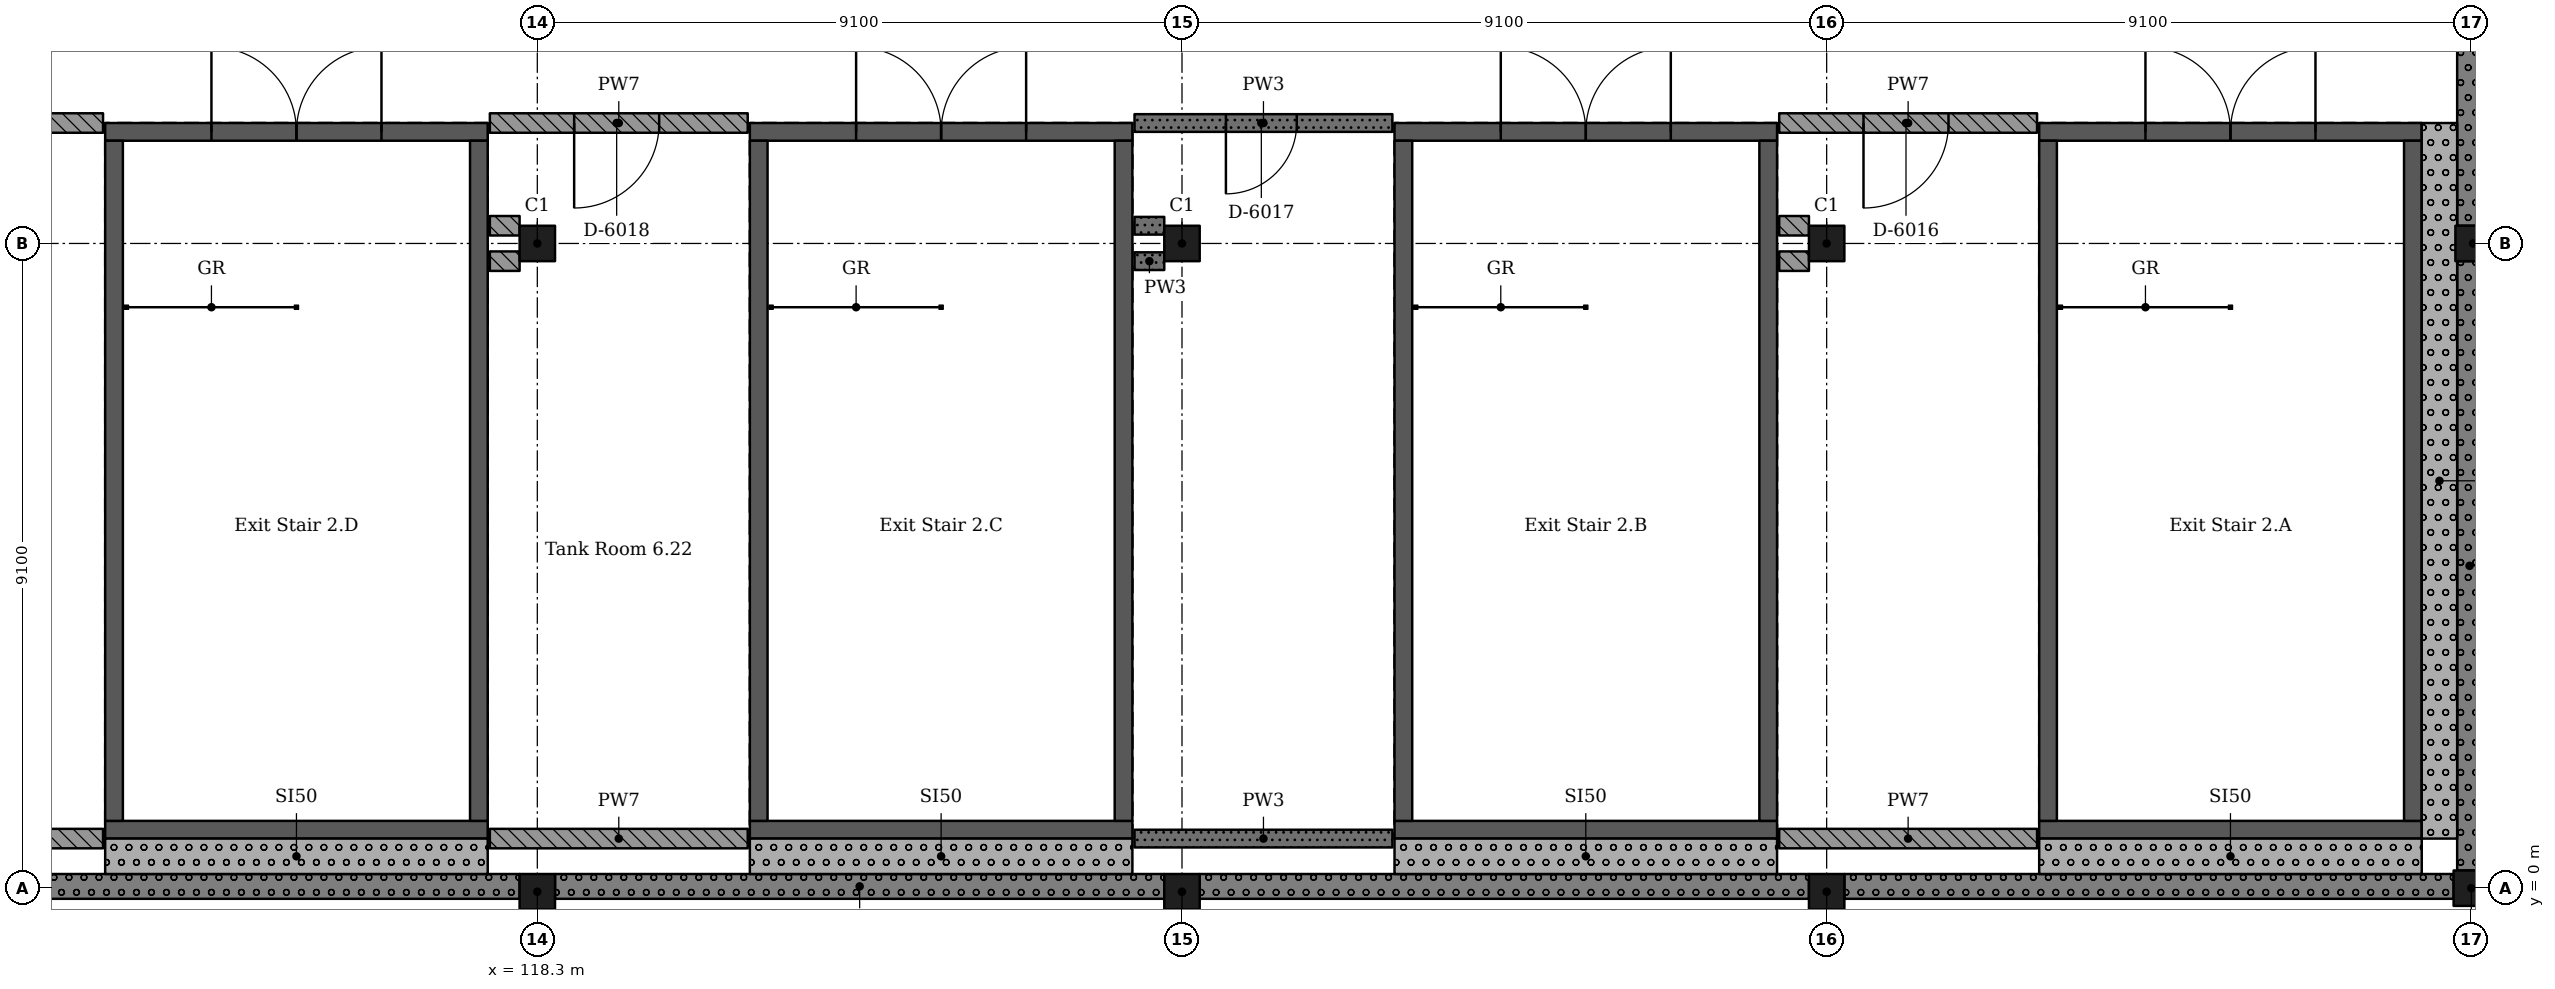
"""IFC4 building model, lengths in metres.
Left out: names, types, materials, properties, quantities, classifications, styles, units other than length and angle.
Written with IfcOpenShell. Run it as: python <this file> out.ifc"""

import sys

from ifc_helpers import new_model, si_unit, direction, frame, frame_2d, origin, origin_2d, place, context, subcontext, project, spatial, rectangle, extrude, element, fill, save


model = new_model("IFC4")
c1 = context("Model", 3, precision=1e-05, world=origin(), true_north=direction((0.0, 1.0)))
c2 = subcontext(c1, "Body", "Model", "MODEL_VIEW")
j1 = project(units=[si_unit("LENGTHUNIT", "METRE"), si_unit("PLANEANGLEUNIT", "RADIAN")], contexts=[c1])
p1 = place(None, origin())
s1 = spatial("IfcSite", under=j1, at=p1, CompositionType="ELEMENT")
p2 = place(p1, origin())
s2 = spatial("IfcBuilding", under=s1, at=p2, CompositionType="ELEMENT")
p3 = place(p2, frame((0.0, 0.0, 29.12)))
s3 = spatial("IfcBuildingStorey", under=s2, at=p3, CompositionType="ELEMENT", Elevation=29.12)
for number, where, z_axis, x_axis in (
    (1, (118.3, -0.05, 0.0), (0.0, 0.0, 1.0), (1.0, 0.0, 0.0)),
    (2, (118.3, 9.1, 0.0), (0.0, 0.0, 1.0), (1.0, 0.0, 0.0)),
    (3, (127.4, -0.05, 0.0), (0.0, 0.0, 1.0), (1.0, 0.0, 0.0)),
    (4, (127.4, 9.1, 0.0), (0.0, 0.0, 1.0), (1.0, 0.0, 0.0)),
    (5, (136.5, -0.05, 0.0), (0.0, 0.0, 1.0), (1.0, 0.0, 0.0)),
    (6, (136.5, 9.1, 0.0), (0.0, 0.0, 1.0), (1.0, 0.0, 0.0)),
    (7, (145.6, 0.0, 0.0), (0.0, 0.0, 1.0), (1.0, 0.0, 0.0)),
    (8, (145.625, 9.1, 0.0), (0.0, 0.0, 1.0), (1.0, 0.0, 0.0)),
):
    element("IfcColumn", number, at=place(p3, frame(where, z_axis=z_axis, x_axis=x_axis)), inside=s3, PredefinedType="COLUMN", context=c2, shape_type="SweptSolid", body=[
        extrude(rectangle(XDim=0.5, YDim=0.5, at=origin_2d()), origin(), (0.0, 0.0, 1.0), 4.55),
    ])
p4 = place(p3, frame((144.9, 0.825, 0.0), z_axis=(0.0, 0.0, 1.0), x_axis=(-1.0, 0.0, 0.0)))
e9 = element("IfcWall", 9, at=p4, inside=s3, PredefinedType="SHEAR", context=c2, shape_type="SweptSolid", body=[
    extrude(rectangle(XDim=5.4, YDim=0.25, at=frame_2d((2.7, 0.0))), origin(), (0.0, 0.0, 1.0), 4.55),
])
p5 = place(p3, frame((144.9, 10.675, 0.0), z_axis=(0.0, 0.0, 1.0), x_axis=(-1.0, 0.0, 0.0)))
e10 = element("IfcWall", 10, at=p5, inside=s3, PredefinedType="SHEAR", context=c2, shape_type="SweptSolid", body=[
    extrude(rectangle(XDim=5.4, YDim=0.25, at=frame_2d((2.7, 0.0))), origin(), (0.0, 0.0, 1.0), 4.55),
])
p6 = place(p5, frame((1.5, 0.0, 0.0)))
e11 = element("IfcOpeningElement", 11, at=p6, cuts=e10, PredefinedType="OPENING", context=c2, shape_type="SweptSolid", body=[
    extrude(rectangle(XDim=2.4, YDim=2.1, at=frame_2d((1.2, 1.05))), frame((0.0, 0.135, 0.0), z_axis=(0.0, -1.0, 0.0), x_axis=(1.0, 0.0, 0.0)), (0.0, 0.0, 1.0), 0.27),
])
for number, where, z_axis, x_axis in (
    (12, (139.625, 10.55, 0.0), (0.0, 0.0, 1.0), (0.0, -1.0, 0.0)),
    (13, (144.775, 10.55, 0.0), (0.0, 0.0, 1.0), (0.0, -1.0, 0.0)),
):
    element("IfcWall", number, at=place(p3, frame(where, z_axis=z_axis, x_axis=x_axis)), inside=s3, PredefinedType="SHEAR", context=c2, shape_type="SweptSolid", body=[
        extrude(rectangle(XDim=9.6, YDim=0.25, at=frame_2d((4.8, 0.0))), origin(), (0.0, 0.0, 1.0), 4.55),
    ])
p7 = place(p3, frame((135.8, 0.825, 0.0), z_axis=(0.0, 0.0, 1.0), x_axis=(-1.0, 0.0, 0.0)))
e14 = element("IfcWall", 14, at=p7, inside=s3, PredefinedType="SHEAR", context=c2, shape_type="SweptSolid", body=[
    extrude(rectangle(XDim=5.4, YDim=0.25, at=frame_2d((2.7, 0.0))), origin(), (0.0, 0.0, 1.0), 4.55),
])
p8 = place(p3, frame((135.8, 10.675, 0.0), z_axis=(0.0, 0.0, 1.0), x_axis=(-1.0, 0.0, 0.0)))
e15 = element("IfcWall", 15, at=p8, inside=s3, PredefinedType="SHEAR", context=c2, shape_type="SweptSolid", body=[
    extrude(rectangle(XDim=5.4, YDim=0.25, at=frame_2d((2.7, 0.0))), origin(), (0.0, 0.0, 1.0), 4.55),
])
p9 = place(p8, frame((1.5, 0.0, 0.0)))
e16 = element("IfcOpeningElement", 16, at=p9, cuts=e15, PredefinedType="OPENING", context=c2, shape_type="SweptSolid", body=[
    extrude(rectangle(XDim=2.4, YDim=2.1, at=frame_2d((1.2, 1.05))), frame((0.0, 0.135, 0.0), z_axis=(0.0, -1.0, 0.0), x_axis=(1.0, 0.0, 0.0)), (0.0, 0.0, 1.0), 0.27),
])
for number, where, z_axis, x_axis in (
    (17, (130.525, 10.55, 0.0), (0.0, 0.0, 1.0), (0.0, -1.0, 0.0)),
    (18, (135.675, 10.55, 0.0), (0.0, 0.0, 1.0), (0.0, -1.0, 0.0)),
):
    element("IfcWall", number, at=place(p3, frame(where, z_axis=z_axis, x_axis=x_axis)), inside=s3, PredefinedType="SHEAR", context=c2, shape_type="SweptSolid", body=[
        extrude(rectangle(XDim=9.6, YDim=0.25, at=frame_2d((4.8, 0.0))), origin(), (0.0, 0.0, 1.0), 4.55),
    ])
p10 = place(p3, frame((126.7, 0.825, 0.0), z_axis=(0.0, 0.0, 1.0), x_axis=(-1.0, 0.0, 0.0)))
e19 = element("IfcWall", 19, at=p10, inside=s3, PredefinedType="SHEAR", context=c2, shape_type="SweptSolid", body=[
    extrude(rectangle(XDim=5.4, YDim=0.25, at=frame_2d((2.7, 0.0))), origin(), (0.0, 0.0, 1.0), 4.55),
])
p11 = place(p3, frame((126.7, 10.675, 0.0), z_axis=(0.0, 0.0, 1.0), x_axis=(-1.0, 0.0, 0.0)))
e20 = element("IfcWall", 20, at=p11, inside=s3, PredefinedType="SHEAR", context=c2, shape_type="SweptSolid", body=[
    extrude(rectangle(XDim=5.4, YDim=0.25, at=frame_2d((2.7, 0.0))), origin(), (0.0, 0.0, 1.0), 4.55),
])
p12 = place(p11, frame((1.5, 0.0, 0.0)))
e21 = element("IfcOpeningElement", 21, at=p12, cuts=e20, PredefinedType="OPENING", context=c2, shape_type="SweptSolid", body=[
    extrude(rectangle(XDim=2.4, YDim=2.1, at=frame_2d((1.2, 1.05))), frame((0.0, 0.135, 0.0), z_axis=(0.0, -1.0, 0.0), x_axis=(1.0, 0.0, 0.0)), (0.0, 0.0, 1.0), 0.27),
])
for number, where, z_axis, x_axis in (
    (22, (121.425, 10.55, 0.0), (0.0, 0.0, 1.0), (0.0, -1.0, 0.0)),
    (23, (126.575, 10.55, 0.0), (0.0, 0.0, 1.0), (0.0, -1.0, 0.0)),
):
    element("IfcWall", number, at=place(p3, frame(where, z_axis=z_axis, x_axis=x_axis)), inside=s3, PredefinedType="SHEAR", context=c2, shape_type="SweptSolid", body=[
        extrude(rectangle(XDim=9.6, YDim=0.25, at=frame_2d((4.8, 0.0))), origin(), (0.0, 0.0, 1.0), 4.55),
    ])
p13 = place(p3, frame((117.6, 0.825, 0.0), z_axis=(0.0, 0.0, 1.0), x_axis=(-1.0, 0.0, 0.0)))
e24 = element("IfcWall", 24, at=p13, inside=s3, PredefinedType="SHEAR", context=c2, shape_type="SweptSolid", body=[
    extrude(rectangle(XDim=5.4, YDim=0.25, at=frame_2d((2.7, 0.0))), origin(), (0.0, 0.0, 1.0), 4.55),
])
p14 = place(p3, frame((117.6, 10.675, 0.0), z_axis=(0.0, 0.0, 1.0), x_axis=(-1.0, 0.0, 0.0)))
e25 = element("IfcWall", 25, at=p14, inside=s3, PredefinedType="SHEAR", context=c2, shape_type="SweptSolid", body=[
    extrude(rectangle(XDim=5.4, YDim=0.25, at=frame_2d((2.7, 0.0))), origin(), (0.0, 0.0, 1.0), 4.55),
])
p15 = place(p14, frame((1.5, 0.0, 0.0)))
e26 = element("IfcOpeningElement", 26, at=p15, cuts=e25, PredefinedType="OPENING", context=c2, shape_type="SweptSolid", body=[
    extrude(rectangle(XDim=2.4, YDim=2.1, at=frame_2d((1.2, 1.05))), frame((0.0, 0.135, 0.0), z_axis=(0.0, -1.0, 0.0), x_axis=(1.0, 0.0, 0.0)), (0.0, 0.0, 1.0), 0.27),
])
for number, where, z_axis, x_axis in (
    (27, (112.325, 10.55, 0.0), (0.0, 0.0, 1.0), (0.0, -1.0, 0.0)),
    (28, (117.475, 10.55, 0.0), (0.0, 0.0, 1.0), (0.0, -1.0, 0.0)),
):
    element("IfcWall", number, at=place(p3, frame(where, z_axis=z_axis, x_axis=x_axis)), inside=s3, PredefinedType="SHEAR", context=c2, shape_type="SweptSolid", body=[
        extrude(rectangle(XDim=9.6, YDim=0.25, at=frame_2d((4.8, 0.0))), origin(), (0.0, 0.0, 1.0), 4.55),
    ])
p16 = place(p3, frame((109.45, 0.025, 0.0), z_axis=(0.0, 0.0, 1.0), x_axis=(1.0, 0.0, 0.0)))
e29 = element("IfcWall", 29, at=p16, inside=s3, PredefinedType="SOLIDWALL", context=c2, shape_type="SweptSolid", body=[
    extrude(rectangle(XDim=8.6, YDim=0.35, at=frame_2d((4.3, 0.0))), origin(), (0.0, 0.0, 1.0), 4.5),
])
p17 = place(p3, frame((118.55, 0.025, 0.0), z_axis=(0.0, 0.0, 1.0), x_axis=(1.0, 0.0, 0.0)))
e30 = element("IfcWall", 30, at=p17, inside=s3, PredefinedType="SOLIDWALL", context=c2, shape_type="SweptSolid", body=[
    extrude(rectangle(XDim=8.6, YDim=0.35, at=frame_2d((4.3, 0.0))), origin(), (0.0, 0.0, 1.0), 4.5),
])
for number, where, z_axis, x_axis in (
    (31, (127.65, 0.025, 0.0), (0.0, 0.0, 1.0), (1.0, 0.0, 0.0)),
    (32, (136.75, 0.025, 0.0), (0.0, 0.0, 1.0), (1.0, 0.0, 0.0)),
    (33, (145.575, 0.25, 0.0), (0.0, 0.0, 1.0), (0.0, 1.0, 0.0)),
):
    element("IfcWall", number, at=place(p3, frame(where, z_axis=z_axis, x_axis=x_axis)), inside=s3, PredefinedType="SOLIDWALL", context=c2, shape_type="SweptSolid", body=[
        extrude(rectangle(XDim=8.6, YDim=0.35, at=frame_2d((4.3, 0.0))), origin(), (0.0, 0.0, 1.0), 4.5),
    ])
p18 = place(p3, frame((145.575, 9.35, 0.0), z_axis=(0.0, 0.0, 1.0), x_axis=(0.0, 1.0, 0.0)))
e34 = element("IfcWall", 34, at=p18, inside=s3, PredefinedType="SOLIDWALL", context=c2, shape_type="SweptSolid", body=[
    extrude(rectangle(XDim=8.6, YDim=0.35, at=frame_2d((4.3, 0.0))), origin(), (0.0, 0.0, 1.0), 4.5),
])
p19 = place(p3, frame((139.5, 0.45, 0.0), z_axis=(0.0, 0.0, 1.0), x_axis=(1.0, 0.0, 0.0)))
e35 = element("IfcWall", 35, at=p19, inside=s3, PredefinedType="SOLIDWALL", context=c2, shape_type="SweptSolid", body=[
    extrude(rectangle(XDim=5.4, YDim=0.5, at=frame_2d((2.7, 0.0))), origin(), (0.0, 0.0, 1.0), 3.88),
])
p20 = place(p3, frame((145.15, 0.7, 0.0), z_axis=(0.0, 0.0, 1.0), x_axis=(0.0, 1.0, 0.0)))
e36 = element("IfcWall", 36, at=p20, inside=s3, PredefinedType="SOLIDWALL", context=c2, shape_type="SweptSolid", body=[
    extrude(rectangle(XDim=10.1, YDim=0.5, at=frame_2d((5.05, 0.0))), origin(), (0.0, 0.0, 1.0), 4.55),
])
p21 = place(p3, frame((130.4, 0.45, 0.0), z_axis=(0.0, 0.0, 1.0), x_axis=(1.0, 0.0, 0.0)))
e37 = element("IfcWall", 37, at=p21, inside=s3, PredefinedType="SOLIDWALL", context=c2, shape_type="SweptSolid", body=[
    extrude(rectangle(XDim=5.4, YDim=0.5, at=frame_2d((2.7, 0.0))), origin(), (0.0, 0.0, 1.0), 3.88),
])
p22 = place(p3, frame((121.3, 0.45, 0.0), z_axis=(0.0, 0.0, 1.0), x_axis=(1.0, 0.0, 0.0)))
e38 = element("IfcWall", 38, at=p22, inside=s3, PredefinedType="SOLIDWALL", context=c2, shape_type="SweptSolid", body=[
    extrude(rectangle(XDim=5.4, YDim=0.5, at=frame_2d((2.7, 0.0))), origin(), (0.0, 0.0, 1.0), 3.88),
])
p23 = place(p3, frame((112.2, 0.45, 0.0), z_axis=(0.0, 0.0, 1.0), x_axis=(1.0, 0.0, 0.0)))
e39 = element("IfcWall", 39, at=p23, inside=s3, PredefinedType="SOLIDWALL", context=c2, shape_type="SweptSolid", body=[
    extrude(rectangle(XDim=5.4, YDim=0.5, at=frame_2d((2.7, 0.0))), origin(), (0.0, 0.0, 1.0), 3.88),
])
p24 = place(p3, frame((112.17, 0.7, 0.0), z_axis=(0.0, 0.0, 1.0), x_axis=(-1.0, 0.0, 0.0)))
e40 = element("IfcWall", 40, at=p24, inside=s3, PredefinedType="SOLIDWALL", context=c2, shape_type="SweptSolid", body=[
    extrude(rectangle(XDim=7.27, YDim=0.275, at=frame_2d((3.635, 0.0))), origin(), (0.0, 0.0, 1.0), 3.88),
])
p25 = place(p3, frame((112.17, 10.8, 0.0), z_axis=(0.0, 0.0, 1.0), x_axis=(-1.0, 0.0, 0.0)))
e41 = element("IfcWall", 41, at=p25, inside=s3, PredefinedType="SOLIDWALL", context=c2, shape_type="SweptSolid", body=[
    extrude(rectangle(XDim=2.857, YDim=0.275, at=frame_2d((1.429, 0.0))), origin(), (0.0, 0.0, 1.0), 3.88),
])
for number, where, z_axis, x_axis in (
    (42, (117.63, 8.85, 0.0), (0.0, 0.0, 1.0), (1.0, 0.0, 0.0)),
    (43, (118.05, 9.35, 0.0), (0.0, 0.0, 1.0), (-1.0, 0.0, 0.0)),
):
    element("IfcWall", number, at=place(p3, frame(where, z_axis=z_axis, x_axis=x_axis)), inside=s3, PredefinedType="SOLIDWALL", context=c2, shape_type="SweptSolid", body=[
        extrude(rectangle(XDim=0.42, YDim=0.275, at=frame_2d((0.21, 0.0))), origin(), (0.0, 0.0, 1.0), 3.88),
    ])
p26 = place(p3, frame((121.27, 0.7, 0.0), z_axis=(0.0, 0.0, 1.0), x_axis=(-1.0, 0.0, 0.0)))
e44 = element("IfcWall", 44, at=p26, inside=s3, PredefinedType="SOLIDWALL", context=c2, shape_type="SweptSolid", body=[
    extrude(rectangle(XDim=3.64, YDim=0.275, at=frame_2d((1.82, 0.0))), origin(), (0.0, 0.0, 1.0), 3.88),
])
p27 = place(p3, frame((121.27, 10.8, 0.0), z_axis=(0.0, 0.0, 1.0), x_axis=(-1.0, 0.0, 0.0)))
e45 = element("IfcWall", 45, at=p27, inside=s3, PredefinedType="SOLIDWALL", context=c2, shape_type="SweptSolid", body=[
    extrude(rectangle(XDim=3.64, YDim=0.275, at=frame_2d((1.82, 0.0))), origin(), (0.0, 0.0, 1.0), 3.88),
])
p28 = place(p27, frame((1.25, 0.0, 0.0)))
e46 = element("IfcOpeningElement", 46, at=p28, cuts=e45, PredefinedType="OPENING", context=c2, shape_type="SweptSolid", body=[
    extrude(rectangle(XDim=1.2, YDim=2.4, at=frame_2d((0.6, 1.2))), frame((0.0, 0.147, 0.0), z_axis=(0.0, -1.0, 0.0), x_axis=(1.0, 0.0, 0.0)), (0.0, 0.0, 1.0), 0.295),
])
for number, where, z_axis, x_axis in (
    (47, (126.73, 8.85, 0.0), (0.0, 0.0, 1.0), (1.0, 0.0, 0.0)),
    (48, (127.15, 9.35, 0.0), (0.0, 0.0, 1.0), (-1.0, 0.0, 0.0)),
):
    element("IfcWall", number, at=place(p3, frame(where, z_axis=z_axis, x_axis=x_axis)), inside=s3, PredefinedType="SOLIDWALL", context=c2, shape_type="SweptSolid", body=[
        extrude(rectangle(XDim=0.42, YDim=0.25, at=frame_2d((0.21, 0.0))), origin(), (0.0, 0.0, 1.0), 3.88),
    ])
p29 = place(p3, frame((130.37, 0.7, 0.0), z_axis=(0.0, 0.0, 1.0), x_axis=(-1.0, 0.0, 0.0)))
e49 = element("IfcWall", 49, at=p29, inside=s3, PredefinedType="SOLIDWALL", context=c2, shape_type="SweptSolid", body=[
    extrude(rectangle(XDim=3.64, YDim=0.25, at=frame_2d((1.82, 0.0))), origin(), (0.0, 0.0, 1.0), 3.88),
])
p30 = place(p3, frame((130.37, 10.8, 0.0), z_axis=(0.0, 0.0, 1.0), x_axis=(-1.0, 0.0, 0.0)))
e50 = element("IfcWall", 50, at=p30, inside=s3, PredefinedType="SOLIDWALL", context=c2, shape_type="SweptSolid", body=[
    extrude(rectangle(XDim=3.64, YDim=0.25, at=frame_2d((1.82, 0.0))), origin(), (0.0, 0.0, 1.0), 3.88),
])
p31 = place(p30, frame((1.35, 0.0, 0.0)))
e51 = element("IfcOpeningElement", 51, at=p31, cuts=e50, PredefinedType="OPENING", context=c2, shape_type="SweptSolid", body=[
    extrude(rectangle(XDim=1.0, YDim=2.1, at=frame_2d((0.5, 1.05))), frame((0.0, 0.135, 0.0), z_axis=(0.0, -1.0, 0.0), x_axis=(1.0, 0.0, 0.0)), (0.0, 0.0, 1.0), 0.27),
])
for number, where, z_axis, x_axis in (
    (52, (135.83, 8.85, 0.0), (0.0, 0.0, 1.0), (1.0, 0.0, 0.0)),
    (53, (136.25, 9.35, 0.0), (0.0, 0.0, 1.0), (-1.0, 0.0, 0.0)),
):
    element("IfcWall", number, at=place(p3, frame(where, z_axis=z_axis, x_axis=x_axis)), inside=s3, PredefinedType="SOLIDWALL", context=c2, shape_type="SweptSolid", body=[
        extrude(rectangle(XDim=0.42, YDim=0.275, at=frame_2d((0.21, 0.0))), origin(), (0.0, 0.0, 1.0), 3.88),
    ])
p32 = place(p3, frame((139.47, 0.7, 0.0), z_axis=(0.0, 0.0, 1.0), x_axis=(-1.0, 0.0, 0.0)))
e54 = element("IfcWall", 54, at=p32, inside=s3, PredefinedType="SOLIDWALL", context=c2, shape_type="SweptSolid", body=[
    extrude(rectangle(XDim=3.64, YDim=0.275, at=frame_2d((1.82, 0.0))), origin(), (0.0, 0.0, 1.0), 3.88),
])
p33 = place(p3, frame((139.47, 10.8, 0.0), z_axis=(0.0, 0.0, 1.0), x_axis=(-1.0, 0.0, 0.0)))
e55 = element("IfcWall", 55, at=p33, inside=s3, PredefinedType="SOLIDWALL", context=c2, shape_type="SweptSolid", body=[
    extrude(rectangle(XDim=3.64, YDim=0.275, at=frame_2d((1.82, 0.0))), origin(), (0.0, 0.0, 1.0), 3.88),
])
p34 = place(p33, frame((1.25, 0.0, 0.0)))
e56 = element("IfcOpeningElement", 56, at=p34, cuts=e55, PredefinedType="OPENING", context=c2, shape_type="SweptSolid", body=[
    extrude(rectangle(XDim=1.2, YDim=2.4, at=frame_2d((0.6, 1.2))), frame((0.0, 0.147, 0.0), z_axis=(0.0, -1.0, 0.0), x_axis=(1.0, 0.0, 0.0)), (0.0, 0.0, 1.0), 0.295),
])
p35 = place(p34, origin())
e57 = element("IfcDoor", 57, at=p35, inside=s3, OperationType="SINGLE_SWING_LEFT", PredefinedType="DOOR", context=c2, shape_type="SweptSolid", body=[
    extrude(rectangle(XDim=1.2, YDim=2.4, at=frame_2d((0.6, 1.2))), frame((0.0, 0.025, 0.0), z_axis=(0.0, -1.0, 0.0), x_axis=(1.0, 0.0, 0.0)), (0.0, 0.0, 1.0), 0.05),
])
fill(e56, e57)
p36 = place(p31, origin())
e58 = element("IfcDoor", 58, at=p36, inside=s3, OperationType="SINGLE_SWING_LEFT", PredefinedType="DOOR", context=c2, shape_type="SweptSolid", body=[
    extrude(rectangle(XDim=1.0, YDim=2.1, at=frame_2d((0.5, 1.05))), frame((0.0, 0.025, 0.0), z_axis=(0.0, -1.0, 0.0), x_axis=(1.0, 0.0, 0.0)), (0.0, 0.0, 1.0), 0.05),
])
fill(e51, e58)
p37 = place(p28, origin())
e59 = element("IfcDoor", 59, at=p37, inside=s3, OperationType="SINGLE_SWING_LEFT", PredefinedType="DOOR", context=c2, shape_type="SweptSolid", body=[
    extrude(rectangle(XDim=1.2, YDim=2.4, at=frame_2d((0.6, 1.2))), frame((0.0, 0.025, 0.0), z_axis=(0.0, -1.0, 0.0), x_axis=(1.0, 0.0, 0.0)), (0.0, 0.0, 1.0), 0.05),
])
fill(e46, e59)
p38 = place(p6, origin())
e60 = element("IfcDoor", 60, at=p38, inside=s3, OperationType="DOUBLE_DOOR_SINGLE_SWING", PredefinedType="DOOR", context=c2, shape_type="SweptSolid", body=[
    extrude(rectangle(XDim=2.4, YDim=2.1, at=frame_2d((1.2, 1.05))), frame((0.0, 0.025, 0.0), z_axis=(0.0, -1.0, 0.0), x_axis=(1.0, 0.0, 0.0)), (0.0, 0.0, 1.0), 0.05),
])
fill(e11, e60)
p39 = place(p9, origin())
e61 = element("IfcDoor", 61, at=p39, inside=s3, OperationType="DOUBLE_DOOR_SINGLE_SWING", PredefinedType="DOOR", context=c2, shape_type="SweptSolid", body=[
    extrude(rectangle(XDim=2.4, YDim=2.1, at=frame_2d((1.2, 1.05))), frame((0.0, 0.025, 0.0), z_axis=(0.0, -1.0, 0.0), x_axis=(1.0, 0.0, 0.0)), (0.0, 0.0, 1.0), 0.05),
])
fill(e16, e61)
p40 = place(p12, origin())
e62 = element("IfcDoor", 62, at=p40, inside=s3, OperationType="DOUBLE_DOOR_SINGLE_SWING", PredefinedType="DOOR", context=c2, shape_type="SweptSolid", body=[
    extrude(rectangle(XDim=2.4, YDim=2.1, at=frame_2d((1.2, 1.05))), frame((0.0, 0.025, 0.0), z_axis=(0.0, -1.0, 0.0), x_axis=(1.0, 0.0, 0.0)), (0.0, 0.0, 1.0), 0.05),
])
fill(e21, e62)
p41 = place(p15, origin())
e63 = element("IfcDoor", 63, at=p41, inside=s3, OperationType="DOUBLE_DOOR_SINGLE_SWING", PredefinedType="DOOR", context=c2, shape_type="SweptSolid", body=[
    extrude(rectangle(XDim=2.4, YDim=2.1, at=frame_2d((1.2, 1.05))), frame((0.0, 0.025, 0.0), z_axis=(0.0, -1.0, 0.0), x_axis=(1.0, 0.0, 0.0)), (0.0, 0.0, 1.0), 0.05),
])
fill(e26, e63)
save(model, sys.argv[1])
